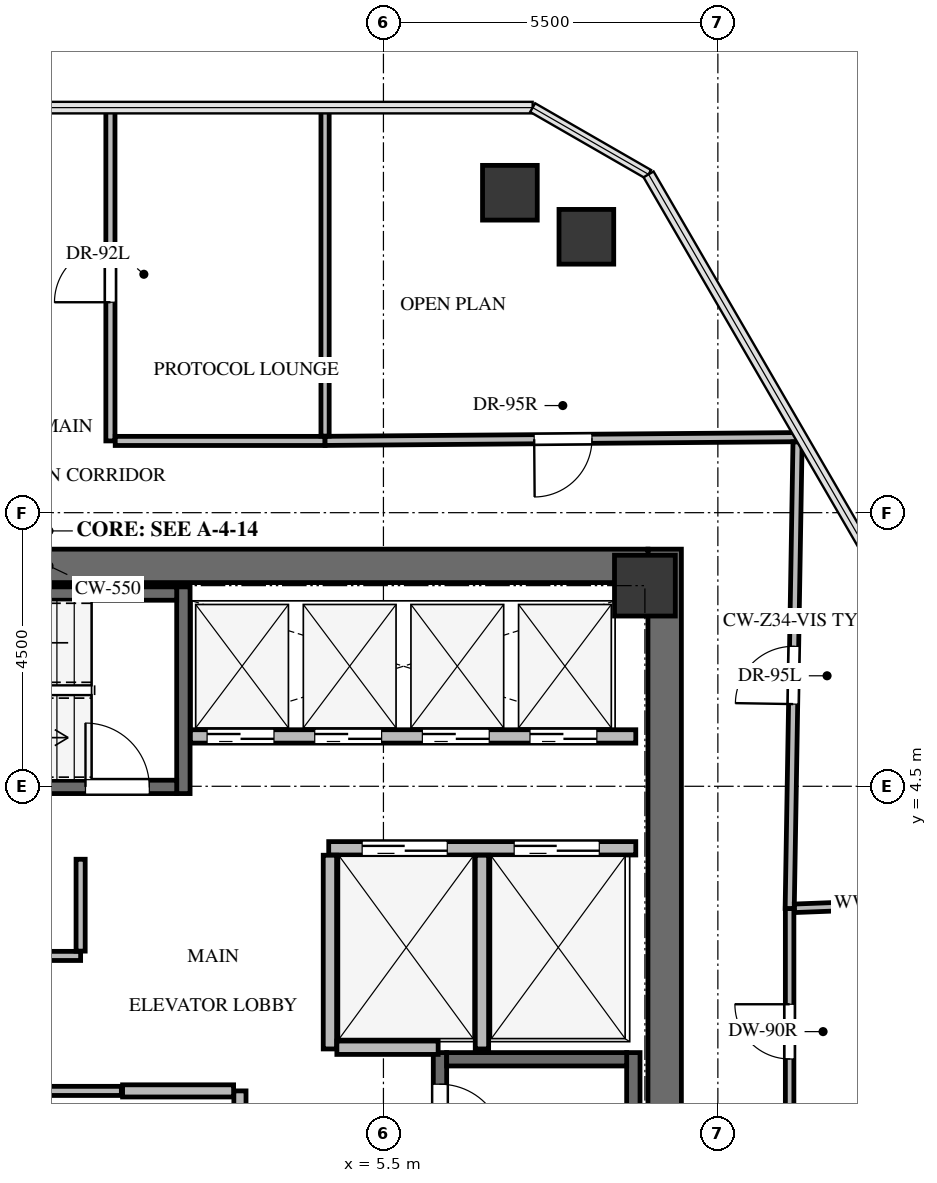
"""IFC4 building model, lengths in metres.
Left out: names, types, materials, properties, quantities, classifications, styles, units other than length and angle.
Written with IfcOpenShell. Run it as: python <this file> out.ifc"""

import sys

from ifc_helpers import new_model, si_unit, direction, frame, frame_2d, origin, origin_2d, place, context, subcontext, project, spatial, rectangle, extrude, source, transform, mapped, element, fill, save


model = new_model("IFC4")
c1 = context("Model", 3, precision=1e-05, world=origin(), true_north=direction((0.0, 1.0)))
c2 = subcontext(c1, "Body", "Model", "MODEL_VIEW")
j1 = project(units=[si_unit("LENGTHUNIT", "METRE"), si_unit("PLANEANGLEUNIT", "RADIAN")], contexts=[c1])
p1 = place(None, origin())
s1 = spatial("IfcSite", under=j1, at=p1, CompositionType="ELEMENT")
p2 = place(p1, origin())
s2 = spatial("IfcBuilding", under=s1, at=p2, CompositionType="ELEMENT")
p3 = place(p2, frame((0.0, 0.0, 238.1)))
s3 = spatial("IfcBuildingStorey", under=s2, at=p3, CompositionType="ELEMENT", Elevation=238.1)
p4 = place(p3, frame((10.125, -8.4, 0.0), z_axis=(0.0, 0.0, 1.0), x_axis=(0.0, 1.0, 0.0)))
e1 = element("IfcWall", 1, at=p4, inside=s3, PredefinedType="SHEAR", context=c2, shape_type="SweptSolid", body=[
    extrude(rectangle(XDim=16.8, YDim=0.55, at=frame_2d((8.4, 0.0))), origin(), (0.0, 0.0, 1.0), 3.3),
])
p5 = place(p3, frame((-9.85, 8.125, 0.0), z_axis=(0.0, 0.0, 1.0), x_axis=(1.0, 0.0, 0.0)))
e2 = element("IfcWall", 2, at=p5, inside=s3, PredefinedType="SHEAR", context=c2, shape_type="SweptSolid", body=[
    extrude(rectangle(XDim=19.7, YDim=0.55, at=frame_2d((9.85, 0.0))), origin(), (0.0, 0.0, 1.0), 3.3),
])
p6 = place(p3, frame((9.61, -7.77, -0.24), z_axis=(0.0, 0.0, 1.0), x_axis=(0.0, 1.0, 0.0)))
e3 = element("IfcWall", 3, at=p6, inside=s3, PredefinedType="SHEAR", context=c2, shape_type="SweptSolid", body=[
    extrude(rectangle(XDim=7.89, YDim=0.22, at=frame_2d((3.945, 0.0))), origin(), (0.0, 0.0, 1.0), 3.3),
])
p7 = place(p3, frame((6.43, 0.12, -0.24), z_axis=(0.0, 0.0, 1.0), x_axis=(0.0, -1.0, 0.0)))
e4 = element("IfcWall", 4, at=p7, inside=s3, PredefinedType="SHEAR", context=c2, shape_type="SweptSolid", body=[
    extrude(rectangle(XDim=7.89, YDim=0.22, at=frame_2d((3.945, 0.0))), origin(), (0.0, 0.0, 1.0), 3.3),
])
p8 = place(p7, frame((0.52, 0.0, 0.0)))
e5 = element("IfcOpeningElement", 5, at=p8, cuts=e4, PredefinedType="OPENING", context=c2, shape_type="SweptSolid", body=[
    extrude(rectangle(XDim=1.05, YDim=2.15, at=frame_2d((0.525, 1.075))), frame((0.0, 0.12, 0.0), z_axis=(0.0, -1.0, 0.0), x_axis=(1.0, 0.0, 0.0)), (0.0, 0.0, 1.0), 0.24),
])
p9 = place(p3, frame((9.5, 0.01, -0.24), z_axis=(0.0, 0.0, 1.0), x_axis=(-1.0, 0.0, 0.0)))
e6 = element("IfcWall", 6, at=p9, inside=s3, PredefinedType="SHEAR", context=c2, shape_type="SweptSolid", body=[
    extrude(rectangle(XDim=2.96, YDim=0.22, at=frame_2d((1.48, 0.0))), origin(), (0.0, 0.0, 1.0), 3.3),
])
p10 = place(p3, frame((2.21, 4.38, -0.24), z_axis=(0.0, 0.0, 1.0), x_axis=(0.0, 1.0, 0.0)))
e7 = element("IfcWall", 7, at=p10, inside=s3, PredefinedType="SHEAR", context=c2, shape_type="SweptSolid", body=[
    extrude(rectangle(XDim=3.4, YDim=0.22, at=frame_2d((1.7, 0.0))), origin(), (0.0, 0.0, 1.0), 3.3),
])
p11 = place(p3, frame((-5.25, 4.49, -0.24), z_axis=(0.0, 0.0, 1.0), x_axis=(1.0, 0.0, 0.0)))
e8 = element("IfcWall", 8, at=p11, inside=s3, PredefinedType="SHEAR", context=c2, shape_type="SweptSolid", body=[
    extrude(rectangle(XDim=7.35, YDim=0.22, at=frame_2d((3.675, 0.0))), origin(), (0.0, 0.0, 1.0), 3.3),
])
p12 = place(p11, frame((5.85, 0.0, 0.0)))
e9 = element("IfcOpeningElement", 9, at=p12, cuts=e8, PredefinedType="OPENING", context=c2, shape_type="SweptSolid", body=[
    extrude(rectangle(XDim=1.05, YDim=2.15, at=frame_2d((0.525, 1.075))), frame((0.0, 0.12, 0.0), z_axis=(0.0, -1.0, 0.0), x_axis=(1.0, 0.0, 0.0)), (0.0, 0.0, 1.0), 0.24),
])
p13 = place(p3, frame((2.1, 7.67, -0.24), z_axis=(0.0, 0.0, 1.0), x_axis=(-1.0, 0.0, 0.0)))
e10 = element("IfcWall", 10, at=p13, inside=s3, PredefinedType="SHEAR", context=c2, shape_type="SweptSolid", body=[
    extrude(rectangle(XDim=7.35, YDim=0.22, at=frame_2d((3.675, 0.0))), origin(), (0.0, 0.0, 1.0), 3.3),
])
m1 = source(origin(), c2, "Body", "SweptSolid", [
    extrude(rectangle(XDim=1.0, YDim=1.0, at=origin_2d()), origin(), (0.0, 0.0, 1.0), 3.3),
])
p14 = place(p3, frame((9.8, 7.8, -0.24), z_axis=(0.0, 0.0, 1.0), x_axis=(1.0, 0.0, 0.0)))
e11 = element("IfcColumn", 11, at=p14, inside=s3, PredefinedType="COLUMN", context=c2, shape_type="MappedRepresentation", body=[
    mapped(m1, transform((0.0, 0.0, 0.0), x_axis=(1.0, 0.0, 0.0), y_axis=(0.0, 1.0, 0.0), z_axis=(0.0, 0.0, 1.0), scale=1.0)),
])
m2 = source(origin(), c2, "Body", "SweptSolid", [
    extrude(rectangle(XDim=0.9, YDim=0.9, at=origin_2d()), origin(), (0.0, 0.0, 1.0), 3.3),
])
for number, where, z_axis, x_axis in (
    (12, (7.58, 14.262, -0.24), (0.0, 0.0, 1.0), (1.0, 0.0, 0.0)),
    (13, (8.837, 13.538, -0.24), (0.0, 0.0, 1.0), (1.0, 0.0, 0.0)),
):
    element("IfcColumn", number, at=place(p3, frame(where, z_axis=z_axis, x_axis=x_axis)), inside=s3, PredefinedType="COLUMN", context=c2, shape_type="MappedRepresentation", body=[
        mapped(m2, transform((0.0, 0.0, 0.0), x_axis=(1.0, 0.0, 0.0), y_axis=(0.0, 1.0, 0.0), z_axis=(0.0, 0.0, 1.0), scale=1.0)),
    ])
p15 = place(p3, frame((4.6, 3.48, 0.0), z_axis=(0.0, 0.0, 1.0), x_axis=(1.0, 0.0, 0.0)))
e14 = element("IfcWall", 14, at=p15, inside=s3, PredefinedType="SOLIDWALL", context=c2, shape_type="SweptSolid", body=[
    extrude(rectangle(XDim=5.05, YDim=0.22, at=frame_2d((2.525, 0.0))), origin(), (0.0, 0.0, 1.0), 3.045),
])
p16 = place(p15, frame((0.55, 0.0, 0.0)))
e15 = element("IfcOpeningElement", 15, at=p16, cuts=e14, PredefinedType="OPENING", context=c2, shape_type="SweptSolid", body=[
    extrude(rectangle(XDim=1.4, YDim=2.15, at=frame_2d((0.7, 1.075))), frame((0.0, 0.12, 0.0), z_axis=(0.0, -1.0, 0.0), x_axis=(1.0, 0.0, 0.0)), (0.0, 0.0, 1.0), 0.24),
])
p17 = place(p15, frame((3.05, 0.0, 0.0)))
e16 = element("IfcOpeningElement", 16, at=p17, cuts=e14, PredefinedType="OPENING", context=c2, shape_type="SweptSolid", body=[
    extrude(rectangle(XDim=1.4, YDim=2.15, at=frame_2d((0.7, 1.075))), frame((0.0, 0.12, 0.0), z_axis=(0.0, -1.0, 0.0), x_axis=(1.0, 0.0, 0.0)), (0.0, 0.0, 1.0), 0.24),
])
for number, where, z_axis, x_axis in (
    (17, (4.62, 0.18, 0.0), (0.0, 0.0, 1.0), (0.0, 1.0, 0.0)),
    (18, (7.12, 0.18, 0.0), (0.0, 0.0, 1.0), (0.0, 1.0, 0.0)),
):
    element("IfcWall", number, at=place(p3, frame(where, z_axis=z_axis, x_axis=x_axis)), inside=s3, PredefinedType="SOLIDWALL", context=c2, shape_type="SweptSolid", body=[
        extrude(rectangle(XDim=3.186, YDim=0.22, at=frame_2d((1.593, 0.0))), origin(), (0.0, 0.0, 1.0), 3.045),
    ])
p18 = place(p3, frame((4.734, 0.2, 0.0), z_axis=(0.0, 0.0, 1.0), x_axis=(1.0, 0.0, 0.0)))
e19 = element("IfcWall", 19, at=p18, inside=s3, PredefinedType="SOLIDWALL", context=c2, shape_type="SweptSolid", body=[
    extrude(rectangle(XDim=1.666, YDim=0.22, at=frame_2d((0.833, 0.0))), origin(), (0.0, 0.0, 1.0), 3.045),
])
p19 = place(p3, frame((2.325, 5.32, 0.0), z_axis=(0.0, 0.0, 1.0), x_axis=(1.0, 0.0, 0.0)))
e20 = element("IfcWall", 20, at=p19, inside=s3, PredefinedType="SOLIDWALL", context=c2, shape_type="SweptSolid", body=[
    extrude(rectangle(XDim=7.325, YDim=0.22, at=frame_2d((3.663, 0.0))), origin(), (0.0, 0.0, 1.0), 3.045),
])
p20 = place(p19, frame((0.275, 0.0, 0.0)))
e21 = element("IfcOpeningElement", 21, at=p20, cuts=e20, PredefinedType="OPENING", context=c2, shape_type="SweptSolid", body=[
    extrude(rectangle(XDim=1.1, YDim=2.15, at=frame_2d((0.55, 1.075))), frame((0.0, 0.12, 0.0), z_axis=(0.0, -1.0, 0.0), x_axis=(1.0, 0.0, 0.0)), (0.0, 0.0, 1.0), 0.24),
])
p21 = place(p19, frame((2.045, 0.0, 0.0)))
e22 = element("IfcOpeningElement", 22, at=p21, cuts=e20, PredefinedType="OPENING", context=c2, shape_type="SweptSolid", body=[
    extrude(rectangle(XDim=1.1, YDim=2.15, at=frame_2d((0.55, 1.075))), frame((0.0, 0.12, 0.0), z_axis=(0.0, -1.0, 0.0), x_axis=(1.0, 0.0, 0.0)), (0.0, 0.0, 1.0), 0.24),
])
p22 = place(p19, frame((3.815, 0.0, 0.0)))
e23 = element("IfcOpeningElement", 23, at=p22, cuts=e20, PredefinedType="OPENING", context=c2, shape_type="SweptSolid", body=[
    extrude(rectangle(XDim=1.1, YDim=2.15, at=frame_2d((0.55, 1.075))), frame((0.0, 0.12, 0.0), z_axis=(0.0, -1.0, 0.0), x_axis=(1.0, 0.0, 0.0)), (0.0, 0.0, 1.0), 0.24),
])
p23 = place(p19, frame((5.585, 0.0, 0.0)))
e24 = element("IfcOpeningElement", 24, at=p23, cuts=e20, PredefinedType="OPENING", context=c2, shape_type="SweptSolid", body=[
    extrude(rectangle(XDim=1.1, YDim=2.15, at=frame_2d((0.55, 1.075))), frame((0.0, 0.12, 0.0), z_axis=(0.0, -1.0, 0.0), x_axis=(1.0, 0.0, 0.0)), (0.0, 0.0, 1.0), 0.24),
])
p24 = place(p3, frame((-4.34, -0.51, 0.0), z_axis=(0.0, 0.0, 1.0), x_axis=(1.0, 0.0, 0.0)))
e25 = element("IfcWall", 25, at=p24, inside=s3, PredefinedType="PARTITIONING", context=c2, shape_type="SweptSolid", body=[
    extrude(rectangle(XDim=5.53, YDim=0.15, at=frame_2d((2.765, 0.0))), origin(), (0.0, 0.0, 1.0), 3.045),
])
p25 = place(p3, frame((3.14, -0.51, 0.0), z_axis=(0.0, 0.0, 1.0), x_axis=(0.0, -1.0, 0.0)))
e26 = element("IfcWall", 26, at=p25, inside=s3, PredefinedType="SOLIDWALL", context=c2, shape_type="SweptSolid", body=[
    extrude(rectangle(XDim=2.53, YDim=0.2, at=frame_2d((1.265, 0.0))), origin(), (0.0, 0.0, 1.0), 3.045),
])
p26 = place(p25, frame((0.815, 0.0, 0.0)))
e27 = element("IfcOpeningElement", 27, at=p26, cuts=e26, PredefinedType="OPENING", context=c2, shape_type="SweptSolid", body=[
    extrude(rectangle(XDim=0.9, YDim=2.05, at=frame_2d((0.45, 1.025))), frame((0.0, 0.11, 0.0), z_axis=(0.0, -1.0, 0.0), x_axis=(1.0, 0.0, 0.0)), (0.0, 0.0, 1.0), 0.22),
])
p27 = place(p3, frame((1.21, -0.51, 0.0), z_axis=(0.0, 0.0, 1.0), x_axis=(1.0, 0.0, 0.0)))
e28 = element("IfcWall", 28, at=p27, inside=s3, PredefinedType="SOLIDWALL", context=c2, shape_type="SweptSolid", body=[
    extrude(rectangle(XDim=1.826, YDim=0.2, at=frame_2d((0.913, 0.0))), origin(), (0.0, 0.0, 1.0), 3.045),
])
p28 = place(p3, frame((0.52, 1.71, 0.0), z_axis=(0.0, 0.0, 1.0), x_axis=(-1.0, 0.0, 0.0)))
e29 = element("IfcWall", 29, at=p28, inside=s3, PredefinedType="PARTITIONING", context=c2, shape_type="SweptSolid", body=[
    extrude(rectangle(XDim=5.816, YDim=0.15, at=frame_2d((2.908, 0.0))), origin(), (0.0, 0.0, 1.0), 3.045),
])
p29 = place(p28, frame((2.458, 0.0, 0.0)))
e30 = element("IfcOpeningElement", 30, at=p29, cuts=e29, PredefinedType="OPENING", context=c2, shape_type="SweptSolid", body=[
    extrude(rectangle(XDim=0.9, YDim=2.05, at=frame_2d((0.45, 1.025))), frame((0.0, 0.085, 0.0), z_axis=(0.0, -1.0, 0.0), x_axis=(1.0, 0.0, 0.0)), (0.0, 0.0, 1.0), 0.17),
])
p30 = place(p3, frame((0.52, 3.3, 0.0), z_axis=(0.0, 0.0, 1.0), x_axis=(0.0, -1.0, 0.0)))
e31 = element("IfcWall", 31, at=p30, inside=s3, PredefinedType="PARTITIONING", context=c2, shape_type="SweptSolid", body=[
    extrude(rectangle(XDim=1.511, YDim=0.15, at=frame_2d((0.755, 0.0))), origin(), (0.0, 0.0, 1.0), 3.045),
])
p31 = place(p3, frame((12.18, -1.56, 0.0), z_axis=(0.0, 0.0, 1.0), x_axis=(0.0, 1.0, 0.0)))
e32 = element("IfcWall", 32, at=p31, inside=s3, PredefinedType="PARTITIONING", context=c2, shape_type="SweptSolid", body=[
    extrude(rectangle(XDim=4.05, YDim=0.14, at=frame_2d((2.025, 0.0))), origin(), (0.0, 0.0, 1.0), 2.301),
])
p32 = place(p31, frame((1.575, 0.0, 0.0)))
e33 = element("IfcOpeningElement", 33, at=p32, cuts=e32, PredefinedType="OPENING", context=c2, shape_type="SweptSolid", body=[
    extrude(rectangle(XDim=0.9, YDim=2.05, at=frame_2d((0.45, 1.025))), frame((0.0, 0.08, 0.0), z_axis=(0.0, -1.0, 0.0), x_axis=(1.0, 0.0, 0.0)), (0.0, 0.0, 1.0), 0.16),
])
p33 = place(p3, frame((1.01, 10.18, 0.0), z_axis=(0.0, 0.0, 1.0), x_axis=(0.0, 1.0, 0.0)))
e34 = element("IfcWall", 34, at=p33, inside=s3, PredefinedType="PARTITIONING", context=c2, shape_type="SweptSolid", body=[
    extrude(rectangle(XDim=5.482, YDim=0.15, at=frame_2d((2.741, 0.0))), origin(), (0.0, 0.0, 1.0), 2.399),
])
p34 = place(p33, frame((2.281, 0.0, 0.0)))
e35 = element("IfcOpeningElement", 35, at=p34, cuts=e34, PredefinedType="OPENING", context=c2, shape_type="SweptSolid", body=[
    extrude(rectangle(XDim=0.92, YDim=2.1, at=frame_2d((0.46, 1.05))), frame((0.0, 0.085, 0.0), z_axis=(0.0, -1.0, 0.0), x_axis=(1.0, 0.0, 0.0)), (0.0, 0.0, 1.0), 0.17),
])
p35 = place(p3, frame((4.54, 10.18, 0.0), z_axis=(0.0, 0.0, 1.0), x_axis=(-1.0, 0.0, 0.0)))
e36 = element("IfcWall", 36, at=p35, inside=s3, PredefinedType="PARTITIONING", context=c2, shape_type="SweptSolid", body=[
    extrude(rectangle(XDim=3.451, YDim=0.15, at=frame_2d((1.726, 0.0))), origin(), (0.0, 0.0, 1.0), 3.045),
])
p36 = place(p3, frame((12.368, 10.243, 0.0), z_axis=(0.0, 0.0, 1.0), x_axis=(-0.999968379606, -0.007952344825, 0.0)))
e37 = element("IfcWall", 37, at=p36, inside=s3, PredefinedType="PARTITIONING", context=c2, shape_type="SweptSolid", body=[
    extrude(rectangle(XDim=7.829, YDim=0.15, at=frame_2d((3.914, 0.0))), origin(), (0.0, 0.0, 1.0), 2.301),
])
p37 = place(p36, frame((3.439, 0.0, 0.0)))
e38 = element("IfcOpeningElement", 38, at=p37, cuts=e37, PredefinedType="OPENING", context=c2, shape_type="SweptSolid", body=[
    extrude(rectangle(XDim=0.95, YDim=2.1, at=frame_2d((0.475, 1.05))), frame((0.0, 0.085, 0.0), z_axis=(0.0, -1.0, 0.0), x_axis=(1.0, 0.0, 0.0)), (0.0, 0.0, 1.0), 0.17),
])
p38 = place(p3, frame((12.181, 2.49, 0.0), z_axis=(0.0, 0.0, 1.0), x_axis=(0.016828669653, 0.999858387912, 0.0)))
e39 = element("IfcWall", 39, at=p38, inside=s3, PredefinedType="PARTITIONING", context=c2, shape_type="SweptSolid", body=[
    extrude(rectangle(XDim=7.674, YDim=0.15, at=frame_2d((3.837, 0.0))), origin(), (0.0, 0.0, 1.0), 2.399),
])
p39 = place(p38, frame((3.362, 0.0, 0.0)))
e40 = element("IfcOpeningElement", 40, at=p39, cuts=e39, PredefinedType="OPENING", context=c2, shape_type="SweptSolid", body=[
    extrude(rectangle(XDim=0.95, YDim=2.1, at=frame_2d((0.475, 1.05))), frame((0.0, 0.085, 0.0), z_axis=(0.0, -1.0, 0.0), x_axis=(1.0, 0.0, 0.0)), (0.0, 0.0, 1.0), 0.17),
])
p40 = place(p3, frame((12.26, 2.493, 0.0), z_axis=(0.0, 0.0, 1.0), x_axis=(0.999256206289, 0.038562082324, 0.0)))
e41 = element("IfcWall", 41, at=p40, inside=s3, PredefinedType="PARTITIONING", context=c2, shape_type="SweptSolid", body=[
    extrude(rectangle(XDim=4.508, YDim=0.14, at=frame_2d((2.254, 0.0))), origin(), (0.0, 0.0, 1.0), 2.399),
])
p41 = place(p3, frame((4.54, 15.662, 0.0), z_axis=(0.0, 0.0, 1.0), x_axis=(0.0, -1.0, 0.0)))
e42 = element("IfcWall", 42, at=p41, inside=s3, PredefinedType="PARTITIONING", context=c2, shape_type="SweptSolid", body=[
    extrude(rectangle(XDim=5.403, YDim=0.135, at=frame_2d((2.701, 0.0))), origin(), (0.0, 0.0, 1.0), 2.399),
])
m3 = source(origin(), c2, "Body", "SweptSolid", [
    extrude(rectangle(XDim=1.05, YDim=2.15, at=frame_2d((0.525, 1.075))), frame((0.0, 0.025, 0.0), z_axis=(0.0, -1.0, 0.0), x_axis=(1.0, 0.0, 0.0)), (0.0, 0.0, 1.0), 0.05),
])
p42 = place(p8, origin())
e43 = element("IfcDoor", 43, at=p42, inside=s3, OperationType="SINGLE_SWING_RIGHT", PredefinedType="DOOR", context=c2, shape_type="MappedRepresentation", body=[
    mapped(m3, transform((0.0, 0.0, 0.0), x_axis=(1.0, 0.0, 0.0), y_axis=(0.0, 1.0, 0.0), z_axis=(0.0, 0.0, 1.0), scale=1.0)),
])
fill(e5, e43)
m4 = source(origin(), c2, "Body", "SweptSolid", [
    extrude(rectangle(XDim=1.05, YDim=2.15, at=frame_2d((0.525, 1.075))), frame((0.0, 0.025, 0.0), z_axis=(0.0, -1.0, 0.0), x_axis=(1.0, 0.0, 0.0)), (0.0, 0.0, 1.0), 0.05),
])
p43 = place(p12, origin())
e44 = element("IfcDoor", 44, at=p43, inside=s3, OperationType="SINGLE_SWING_LEFT", PredefinedType="DOOR", context=c2, shape_type="MappedRepresentation", body=[
    mapped(m4, transform((0.0, 0.0, 0.0), x_axis=(1.0, 0.0, 0.0), y_axis=(0.0, 1.0, 0.0), z_axis=(0.0, 0.0, 1.0), scale=1.0)),
])
fill(e9, e44)
m5 = source(origin(), c2, "Body", "SweptSolid", [
    extrude(rectangle(XDim=1.4, YDim=2.15, at=frame_2d((0.7, 1.075))), frame((0.0, 0.025, 0.0), z_axis=(0.0, -1.0, 0.0), x_axis=(1.0, 0.0, 0.0)), (0.0, 0.0, 1.0), 0.05),
])
p44 = place(p16, origin())
e45 = element("IfcDoor", 45, at=p44, inside=s3, OperationType="DOUBLE_DOOR_SLIDING", PredefinedType="DOOR", context=c2, shape_type="MappedRepresentation", body=[
    mapped(m5, transform((0.0, 0.0, 0.0), x_axis=(1.0, 0.0, 0.0), y_axis=(0.0, 1.0, 0.0), z_axis=(0.0, 0.0, 1.0), scale=1.0)),
])
fill(e15, e45)
p45 = place(p17, origin())
e46 = element("IfcDoor", 46, at=p45, inside=s3, OperationType="DOUBLE_DOOR_SLIDING", PredefinedType="DOOR", context=c2, shape_type="MappedRepresentation", body=[
    mapped(m5, transform((0.0, 0.0, 0.0), x_axis=(1.0, 0.0, 0.0), y_axis=(0.0, 1.0, 0.0), z_axis=(0.0, 0.0, 1.0), scale=1.0)),
])
fill(e16, e46)
m6 = source(origin(), c2, "Body", "SweptSolid", [
    extrude(rectangle(XDim=1.1, YDim=2.15, at=frame_2d((0.55, 1.075))), frame((0.0, 0.025, 0.0), z_axis=(0.0, -1.0, 0.0), x_axis=(1.0, 0.0, 0.0)), (0.0, 0.0, 1.0), 0.05),
])
p46 = place(p20, origin())
e47 = element("IfcDoor", 47, at=p46, inside=s3, OperationType="DOUBLE_DOOR_SLIDING", PredefinedType="DOOR", context=c2, shape_type="MappedRepresentation", body=[
    mapped(m6, transform((0.0, 0.0, 0.0), x_axis=(1.0, 0.0, 0.0), y_axis=(0.0, 1.0, 0.0), z_axis=(0.0, 0.0, 1.0), scale=1.0)),
])
fill(e21, e47)
p47 = place(p21, origin())
e48 = element("IfcDoor", 48, at=p47, inside=s3, OperationType="DOUBLE_DOOR_SLIDING", PredefinedType="DOOR", context=c2, shape_type="MappedRepresentation", body=[
    mapped(m6, transform((0.0, 0.0, 0.0), x_axis=(1.0, 0.0, 0.0), y_axis=(0.0, 1.0, 0.0), z_axis=(0.0, 0.0, 1.0), scale=1.0)),
])
fill(e22, e48)
p48 = place(p22, origin())
e49 = element("IfcDoor", 49, at=p48, inside=s3, OperationType="DOUBLE_DOOR_SLIDING", PredefinedType="DOOR", context=c2, shape_type="MappedRepresentation", body=[
    mapped(m6, transform((0.0, 0.0, 0.0), x_axis=(1.0, 0.0, 0.0), y_axis=(0.0, 1.0, 0.0), z_axis=(0.0, 0.0, 1.0), scale=1.0)),
])
fill(e23, e49)
p49 = place(p23, origin())
e50 = element("IfcDoor", 50, at=p49, inside=s3, OperationType="DOUBLE_DOOR_SLIDING", PredefinedType="DOOR", context=c2, shape_type="MappedRepresentation", body=[
    mapped(m6, transform((0.0, 0.0, 0.0), x_axis=(1.0, 0.0, 0.0), y_axis=(0.0, 1.0, 0.0), z_axis=(0.0, 0.0, 1.0), scale=1.0)),
])
fill(e24, e50)
m7 = source(origin(), c2, "Body", "SweptSolid", [
    extrude(rectangle(XDim=0.9, YDim=2.05, at=frame_2d((0.45, 1.025))), frame((0.0, 0.025, 0.0), z_axis=(0.0, -1.0, 0.0), x_axis=(1.0, 0.0, 0.0)), (0.0, 0.0, 1.0), 0.05),
])
p50 = place(p32, origin())
e51 = element("IfcDoor", 51, at=p50, inside=s3, OperationType="SINGLE_SWING_RIGHT", PredefinedType="DOOR", context=c2, shape_type="MappedRepresentation", body=[
    mapped(m7, transform((0.0, 0.0, 0.0), x_axis=(1.0, 0.0, 0.0), y_axis=(0.0, 1.0, 0.0), z_axis=(0.0, 0.0, 1.0), scale=1.0)),
])
fill(e33, e51)
m8 = source(origin(), c2, "Body", "SweptSolid", [
    extrude(rectangle(XDim=0.92, YDim=2.1, at=frame_2d((0.46, 1.05))), frame((0.0, 0.025, 0.0), z_axis=(0.0, -1.0, 0.0), x_axis=(1.0, 0.0, 0.0)), (0.0, 0.0, 1.0), 0.05),
])
p51 = place(p34, origin())
e52 = element("IfcDoor", 52, at=p51, inside=s3, OperationType="SINGLE_SWING_LEFT", PredefinedType="DOOR", context=c2, shape_type="MappedRepresentation", body=[
    mapped(m8, transform((0.0, 0.0, 0.0), x_axis=(1.0, 0.0, 0.0), y_axis=(0.0, 1.0, 0.0), z_axis=(0.0, 0.0, 1.0), scale=1.0)),
])
fill(e35, e52)
m9 = source(origin(), c2, "Body", "SweptSolid", [
    extrude(rectangle(XDim=0.95, YDim=2.1, at=frame_2d((0.475, 1.05))), frame((0.0, 0.025, 0.0), z_axis=(0.0, -1.0, 0.0), x_axis=(1.0, 0.0, 0.0)), (0.0, 0.0, 1.0), 0.05),
])
p52 = place(p37, origin())
e53 = element("IfcDoor", 53, at=p52, inside=s3, OperationType="SINGLE_SWING_RIGHT", PredefinedType="DOOR", context=c2, shape_type="MappedRepresentation", body=[
    mapped(m9, transform((0.0, 0.0, 0.0), x_axis=(1.0, 0.0, 0.0), y_axis=(0.0, 1.0, 0.0), z_axis=(0.0, 0.0, 1.0), scale=1.0)),
])
fill(e38, e53)
m10 = source(origin(), c2, "Body", "SweptSolid", [
    extrude(rectangle(XDim=0.95, YDim=2.1, at=frame_2d((0.475, 1.05))), frame((0.0, 0.025, 0.0), z_axis=(0.0, -1.0, 0.0), x_axis=(1.0, 0.0, 0.0)), (0.0, 0.0, 1.0), 0.05),
])
p53 = place(p39, origin())
e54 = element("IfcDoor", 54, at=p53, inside=s3, OperationType="SINGLE_SWING_LEFT", PredefinedType="DOOR", context=c2, shape_type="MappedRepresentation", body=[
    mapped(m10, transform((0.0, 0.0, 0.0), x_axis=(1.0, 0.0, 0.0), y_axis=(0.0, 1.0, 0.0), z_axis=(0.0, 0.0, 1.0), scale=1.0)),
])
fill(e40, e54)
save(model, sys.argv[1])
